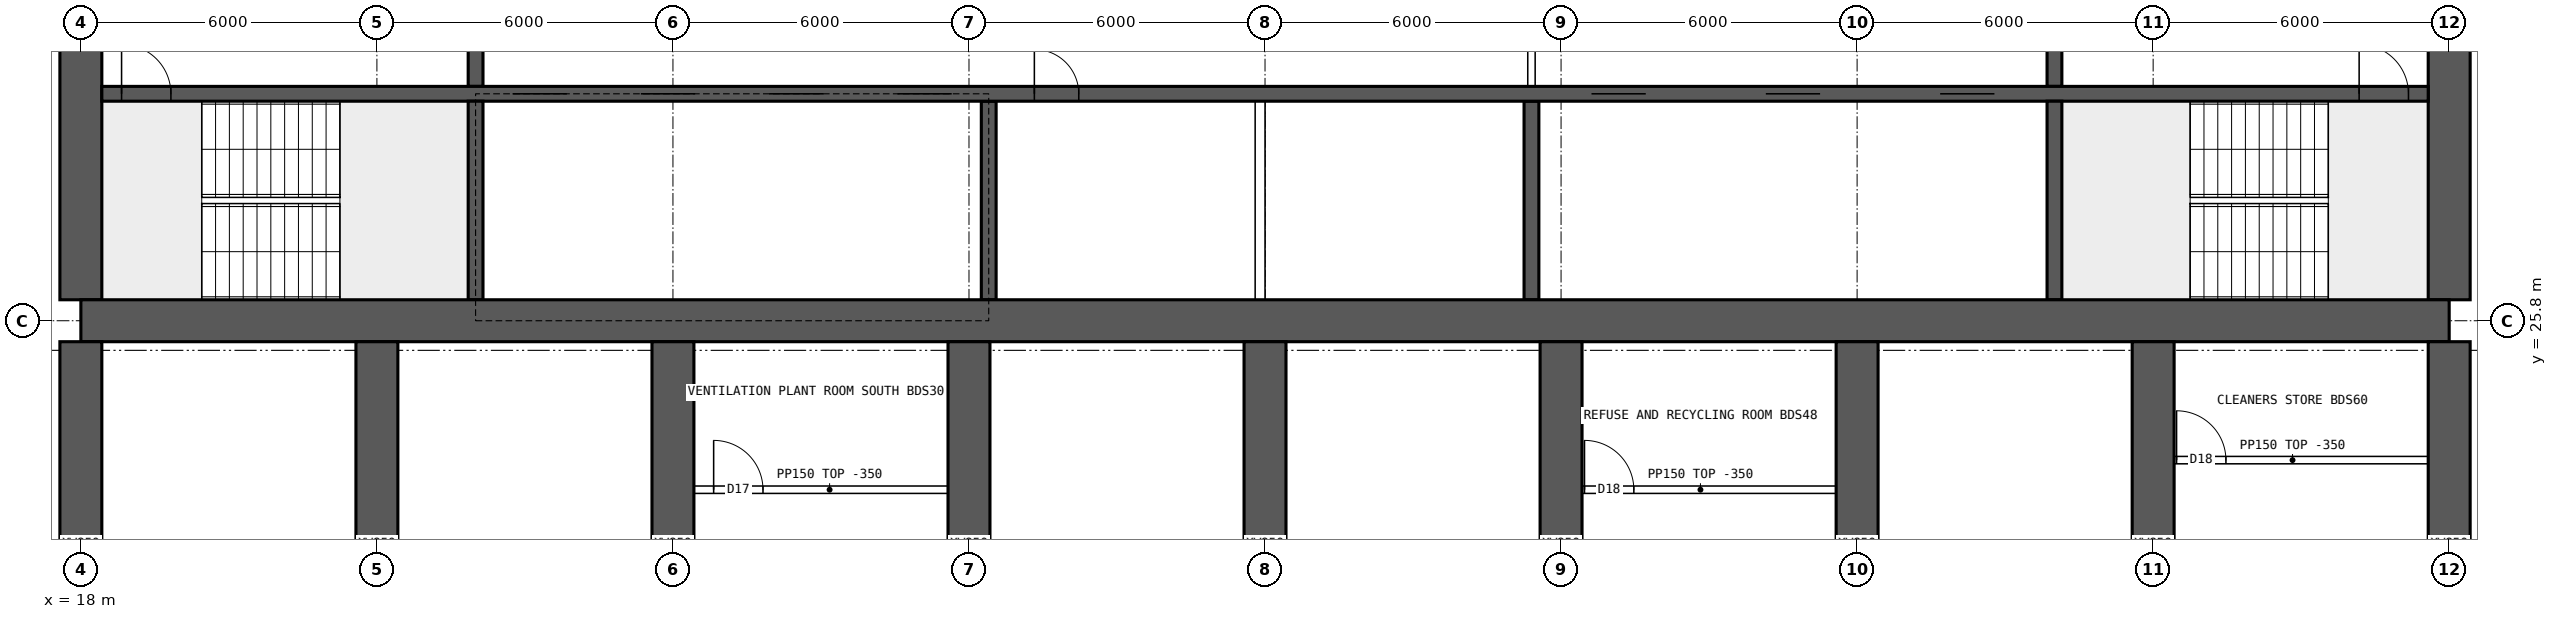
"""IFC4 building model, lengths in metres.
Left out: names, types, materials, properties, quantities, classifications, styles, units other than length and angle.
Written with IfcOpenShell. Run it as: python <this file> out.ifc"""

import sys

from ifc_helpers import new_model, si_unit, direction, frame, frame_2d, origin, place, context, subcontext, project, spatial, rectangle, extrude, element, fill, save


model = new_model("IFC4")
c1 = context("Model", 3, precision=1e-05, world=origin(), true_north=direction((0.0, 1.0)))
c2 = subcontext(c1, "Body", "Model", "MODEL_VIEW")
j1 = project(units=[si_unit("LENGTHUNIT", "METRE"), si_unit("PLANEANGLEUNIT", "RADIAN")], contexts=[c1])
p1 = place(None, origin())
s1 = spatial("IfcSite", under=j1, at=p1, CompositionType="ELEMENT")
p2 = place(p1, origin())
s2 = spatial("IfcBuilding", under=s1, at=p2, CompositionType="ELEMENT")
p3 = place(p2, frame((0.0, 0.0, 197.35)))
s3 = spatial("IfcBuildingStorey", under=s2, at=p3, CompositionType="ELEMENT", Elevation=197.35)
p4 = place(p3, frame((18.0, 25.8, 0.0), z_axis=(0.0, 0.0, 1.0), x_axis=(1.0, 0.0, 0.0)))
e1 = element("IfcWall", 1, at=p4, inside=s3, PredefinedType="SHEAR", context=c2, shape_type="SweptSolid", body=[
    extrude(rectangle(XDim=48.0, YDim=0.85, at=frame_2d((24.0, 0.0))), origin(), (0.0, 0.0, 1.0), 3.75),
])
p5 = place(p3, frame((18.0, 26.225, 0.0), z_axis=(0.0, 0.0, 1.0), x_axis=(0.0, 1.0, 0.0)))
e2 = element("IfcWall", 2, at=p5, inside=s3, PredefinedType="SHEAR", context=c2, shape_type="SweptSolid", body=[
    extrude(rectangle(XDim=11.55, YDim=0.85, at=frame_2d((5.775, 0.0))), origin(), (0.0, 0.0, 1.0), 3.75),
])
p6 = place(p5, frame((5.075, 0.0, 0.0)))
e3 = element("IfcOpeningElement", 3, at=p6, cuts=e2, PredefinedType="OPENING", context=c2, shape_type="SweptSolid", body=[
    extrude(rectangle(XDim=1.2, YDim=2.1, at=frame_2d((0.6, 1.05))), frame((0.0, 0.435, 0.0), z_axis=(0.0, -1.0, 0.0), x_axis=(1.0, 0.0, 0.0)), (0.0, 0.0, 1.0), 0.87),
])
p7 = place(p3, frame((66.0, 26.225, 0.0), z_axis=(0.0, 0.0, 1.0), x_axis=(0.0, 1.0, 0.0)))
e4 = element("IfcWall", 4, at=p7, inside=s3, PredefinedType="SHEAR", context=c2, shape_type="SweptSolid", body=[
    extrude(rectangle(XDim=11.55, YDim=0.85, at=frame_2d((5.775, 0.0))), origin(), (0.0, 0.0, 1.0), 3.75),
])
p8 = place(p7, frame((5.075, 0.0, 0.0)))
e5 = element("IfcOpeningElement", 5, at=p8, cuts=e4, PredefinedType="OPENING", context=c2, shape_type="SweptSolid", body=[
    extrude(rectangle(XDim=1.2, YDim=2.1, at=frame_2d((0.6, 1.05))), frame((0.0, 0.435, 0.0), z_axis=(0.0, -1.0, 0.0), x_axis=(1.0, 0.0, 0.0)), (0.0, 0.0, 1.0), 0.87),
])
p9 = place(p3, frame((18.425, 30.4, 0.0), z_axis=(0.0, 0.0, 1.0), x_axis=(1.0, 0.0, 0.0)))
e6 = element("IfcWall", 6, at=p9, inside=s3, PredefinedType="SHEAR", context=c2, shape_type="SweptSolid", body=[
    extrude(rectangle(XDim=47.15, YDim=0.3, at=frame_2d((23.575, 0.0))), origin(), (0.0, 0.0, 1.0), 3.75),
])
p10 = place(p9, frame((0.4, 0.0, 0.0)))
e7 = element("IfcOpeningElement", 7, at=p10, cuts=e6, PredefinedType="OPENING", context=c2, shape_type="SweptSolid", body=[
    extrude(rectangle(XDim=1.0, YDim=2.1, at=frame_2d((0.5, 1.05))), frame((0.0, 0.16, 0.0), z_axis=(0.0, -1.0, 0.0), x_axis=(1.0, 0.0, 0.0)), (0.0, 0.0, 1.0), 0.32),
])
p11 = place(p9, frame((45.75, 0.0, 0.0)))
e8 = element("IfcOpeningElement", 8, at=p11, cuts=e6, PredefinedType="OPENING", context=c2, shape_type="SweptSolid", body=[
    extrude(rectangle(XDim=1.0, YDim=2.1, at=frame_2d((0.5, 1.05))), frame((0.0, 0.16, 0.0), z_axis=(0.0, -1.0, 0.0), x_axis=(1.0, 0.0, 0.0)), (0.0, 0.0, 1.0), 0.32),
])
p12 = place(p9, frame((8.325, 0.0, 0.0)))
e9 = element("IfcOpeningElement", 9, at=p12, cuts=e6, PredefinedType="OPENING", context=c2, shape_type="SweptSolid", body=[
    extrude(rectangle(XDim=1.1, YDim=2.1, at=frame_2d((0.55, 1.05))), frame((0.0, 0.16, 0.0), z_axis=(0.0, -1.0, 0.0), x_axis=(1.0, 0.0, 0.0)), (0.0, 0.0, 1.0), 0.32),
])
p13 = place(p9, frame((10.925, 0.0, 0.0)))
e10 = element("IfcOpeningElement", 10, at=p13, cuts=e6, PredefinedType="OPENING", context=c2, shape_type="SweptSolid", body=[
    extrude(rectangle(XDim=1.1, YDim=2.1, at=frame_2d((0.55, 1.05))), frame((0.0, 0.16, 0.0), z_axis=(0.0, -1.0, 0.0), x_axis=(1.0, 0.0, 0.0)), (0.0, 0.0, 1.0), 0.32),
])
p14 = place(p9, frame((13.525, 0.0, 0.0)))
e11 = element("IfcOpeningElement", 11, at=p14, cuts=e6, PredefinedType="OPENING", context=c2, shape_type="SweptSolid", body=[
    extrude(rectangle(XDim=1.1, YDim=2.1, at=frame_2d((0.55, 1.05))), frame((0.0, 0.16, 0.0), z_axis=(0.0, -1.0, 0.0), x_axis=(1.0, 0.0, 0.0)), (0.0, 0.0, 1.0), 0.32),
])
p15 = place(p9, frame((16.125, 0.0, 0.0)))
e12 = element("IfcOpeningElement", 12, at=p15, cuts=e6, PredefinedType="OPENING", context=c2, shape_type="SweptSolid", body=[
    extrude(rectangle(XDim=1.1, YDim=2.1, at=frame_2d((0.55, 1.05))), frame((0.0, 0.16, 0.0), z_axis=(0.0, -1.0, 0.0), x_axis=(1.0, 0.0, 0.0)), (0.0, 0.0, 1.0), 0.32),
])
p16 = place(p9, frame((18.9, 0.0, 0.0)))
e13 = element("IfcOpeningElement", 13, at=p16, cuts=e6, PredefinedType="OPENING", context=c2, shape_type="SweptSolid", body=[
    extrude(rectangle(XDim=0.9, YDim=2.1, at=frame_2d((0.45, 1.05))), frame((0.0, 0.16, 0.0), z_axis=(0.0, -1.0, 0.0), x_axis=(1.0, 0.0, 0.0)), (0.0, 0.0, 1.0), 0.32),
])
p17 = place(p9, frame((30.192, 0.0, 0.0)))
e14 = element("IfcOpeningElement", 14, at=p17, cuts=e6, PredefinedType="OPENING", context=c2, shape_type="SweptSolid", body=[
    extrude(rectangle(XDim=1.1, YDim=2.1, at=frame_2d((0.55, 1.05))), frame((0.0, 0.16, 0.0), z_axis=(0.0, -1.0, 0.0), x_axis=(1.0, 0.0, 0.0)), (0.0, 0.0, 1.0), 0.32),
])
p18 = place(p9, frame((33.725, 0.0, 0.0)))
e15 = element("IfcOpeningElement", 15, at=p18, cuts=e6, PredefinedType="OPENING", context=c2, shape_type="SweptSolid", body=[
    extrude(rectangle(XDim=1.1, YDim=2.1, at=frame_2d((0.55, 1.05))), frame((0.0, 0.16, 0.0), z_axis=(0.0, -1.0, 0.0), x_axis=(1.0, 0.0, 0.0)), (0.0, 0.0, 1.0), 0.32),
])
p19 = place(p9, frame((37.258, 0.0, 0.0)))
e16 = element("IfcOpeningElement", 16, at=p19, cuts=e6, PredefinedType="OPENING", context=c2, shape_type="SweptSolid", body=[
    extrude(rectangle(XDim=1.1, YDim=2.1, at=frame_2d((0.55, 1.05))), frame((0.0, 0.16, 0.0), z_axis=(0.0, -1.0, 0.0), x_axis=(1.0, 0.0, 0.0)), (0.0, 0.0, 1.0), 0.32),
])
for number, where, z_axis, x_axis in (
    (17, (26.0, 26.225, 0.0), (0.0, 0.0, 1.0), (0.0, 1.0, 0.0)),
    (18, (58.0, 26.225, 0.0), (0.0, 0.0, 1.0), (0.0, 1.0, 0.0)),
):
    element("IfcWall", number, at=place(p3, frame(where, z_axis=z_axis, x_axis=x_axis)), inside=s3, PredefinedType="SHEAR", context=c2, shape_type="SweptSolid", body=[
        extrude(rectangle(XDim=4.025, YDim=0.3, at=frame_2d((2.012, 0.0))), origin(), (0.0, 0.0, 1.0), 3.75),
    ])
p20 = place(p3, frame((26.0, 30.55, 0.0), z_axis=(0.0, 0.0, 1.0), x_axis=(0.0, 1.0, 0.0)))
e19 = element("IfcWall", 19, at=p20, inside=s3, PredefinedType="SHEAR", context=c2, shape_type="SweptSolid", body=[
    extrude(rectangle(XDim=3.9, YDim=0.3, at=frame_2d((1.95, 0.0))), origin(), (0.0, 0.0, 1.0), 3.75),
])
p21 = place(p20, frame((1.4, 0.0, 0.0)))
e20 = element("IfcOpeningElement", 20, at=p21, cuts=e19, PredefinedType="OPENING", context=c2, shape_type="SweptSolid", body=[
    extrude(rectangle(XDim=1.2, YDim=2.1, at=frame_2d((0.6, 1.05))), frame((0.0, 0.16, 0.0), z_axis=(0.0, -1.0, 0.0), x_axis=(1.0, 0.0, 0.0)), (0.0, 0.0, 1.0), 0.32),
])
p22 = place(p3, frame((58.0, 30.55, 0.0), z_axis=(0.0, 0.0, 1.0), x_axis=(0.0, 1.0, 0.0)))
e21 = element("IfcWall", 21, at=p22, inside=s3, PredefinedType="SHEAR", context=c2, shape_type="SweptSolid", body=[
    extrude(rectangle(XDim=3.9, YDim=0.3, at=frame_2d((1.95, 0.0))), origin(), (0.0, 0.0, 1.0), 3.75),
])
p23 = place(p22, frame((1.4, 0.0, 0.0)))
e22 = element("IfcOpeningElement", 22, at=p23, cuts=e21, PredefinedType="OPENING", context=c2, shape_type="SweptSolid", body=[
    extrude(rectangle(XDim=1.2, YDim=2.1, at=frame_2d((0.6, 1.05))), frame((0.0, 0.16, 0.0), z_axis=(0.0, -1.0, 0.0), x_axis=(1.0, 0.0, 0.0)), (0.0, 0.0, 1.0), 0.32),
])
for number, where, z_axis, x_axis in (
    (23, (36.4, 26.225, 0.0), (0.0, 0.0, 1.0), (0.0, 1.0, 0.0)),
    (24, (47.4, 26.225, 0.0), (0.0, 0.0, 1.0), (0.0, 1.0, 0.0)),
):
    element("IfcWall", number, at=place(p3, frame(where, z_axis=z_axis, x_axis=x_axis)), inside=s3, PredefinedType="SHEAR", context=c2, shape_type="SweptSolid", body=[
        extrude(rectangle(XDim=4.025, YDim=0.3, at=frame_2d((2.012, 0.0))), origin(), (0.0, 0.0, 1.0), 3.75),
    ])
for number, where, z_axis, x_axis in (
    (25, (18.0, 17.2, 0.0), (0.0, 0.0, 1.0), (0.0, 1.0, 0.0)),
    (26, (24.0, 17.2, 0.0), (0.0, 0.0, 1.0), (0.0, 1.0, 0.0)),
    (27, (30.0, 17.2, 0.0), (0.0, 0.0, 1.0), (0.0, 1.0, 0.0)),
    (28, (36.0, 17.2, 0.0), (0.0, 0.0, 1.0), (0.0, 1.0, 0.0)),
    (29, (42.0, 17.2, 0.0), (0.0, 0.0, 1.0), (0.0, 1.0, 0.0)),
    (30, (48.0, 17.2, 0.0), (0.0, 0.0, 1.0), (0.0, 1.0, 0.0)),
    (31, (54.0, 17.2, 0.0), (0.0, 0.0, 1.0), (0.0, 1.0, 0.0)),
    (32, (60.0, 17.2, 0.0), (0.0, 0.0, 1.0), (0.0, 1.0, 0.0)),
    (33, (66.0, 17.2, 0.0), (0.0, 0.0, 1.0), (0.0, 1.0, 0.0)),
):
    element("IfcWall", number, at=place(p3, frame(where, z_axis=z_axis, x_axis=x_axis)), inside=s3, PredefinedType="SHEAR", context=c2, shape_type="SweptSolid", body=[
        extrude(rectangle(XDim=8.175, YDim=0.85, at=frame_2d((4.087, 0.0))), origin(), (0.0, 0.0, 1.0), 3.75),
    ])
p24 = place(p3, frame((47.4, 30.55, 0.0), z_axis=(0.0, 0.0, 1.0), x_axis=(0.0, 1.0, 0.0)))
e34 = element("IfcWall", 34, at=p24, inside=s3, PredefinedType="SOLIDWALL", context=c2, shape_type="SweptSolid", body=[
    extrude(rectangle(XDim=3.9, YDim=0.15, at=frame_2d((1.95, 0.0))), origin(), (0.0, 0.0, 1.0), 3.4),
])
p25 = place(p24, frame((1.15, 0.0, 0.0)))
e35 = element("IfcOpeningElement", 35, at=p25, cuts=e34, PredefinedType="OPENING", context=c2, shape_type="SweptSolid", body=[
    extrude(rectangle(XDim=1.6, YDim=2.1, at=frame_2d((0.8, 1.05))), frame((0.0, 0.085, 0.0), z_axis=(0.0, -1.0, 0.0), x_axis=(1.0, 0.0, 0.0)), (0.0, 0.0, 1.0), 0.17),
])
p26 = place(p3, frame((41.9, 26.225, 0.0), z_axis=(0.0, 0.0, 1.0), x_axis=(0.0, 1.0, 0.0)))
e36 = element("IfcWall", 36, at=p26, inside=s3, PredefinedType="SOLIDWALL", context=c2, shape_type="SweptSolid", body=[
    extrude(rectangle(XDim=4.025, YDim=0.2, at=frame_2d((2.012, 0.0))), origin(), (0.0, 0.0, 1.0), 3.4),
])
p27 = place(p3, frame((30.425, 22.375, 0.0), z_axis=(0.0, 0.0, 1.0), x_axis=(1.0, 0.0, 0.0)))
e37 = element("IfcWall", 37, at=p27, inside=s3, PredefinedType="PARTITIONING", context=c2, shape_type="SweptSolid", body=[
    extrude(rectangle(XDim=5.5, YDim=0.15, at=frame_2d((2.75, 0.0))), origin(), (0.0, 0.0, 1.0), 3.4),
])
p28 = place(p27, frame((0.4, 0.0, 0.0)))
e38 = element("IfcOpeningElement", 38, at=p28, cuts=e37, PredefinedType="OPENING", context=c2, shape_type="SweptSolid", body=[
    extrude(rectangle(XDim=1.0, YDim=2.1, at=frame_2d((0.5, 1.05))), frame((0.0, 0.085, 0.0), z_axis=(0.0, -1.0, 0.0), x_axis=(1.0, 0.0, 0.0)), (0.0, 0.0, 1.0), 0.17),
])
p29 = place(p3, frame((48.075, 22.375, 0.0), z_axis=(0.0, 0.0, 1.0), x_axis=(1.0, 0.0, 0.0)))
e39 = element("IfcWall", 39, at=p29, inside=s3, PredefinedType="PARTITIONING", context=c2, shape_type="SweptSolid", body=[
    extrude(rectangle(XDim=5.5, YDim=0.15, at=frame_2d((2.75, 0.0))), origin(), (0.0, 0.0, 1.0), 3.4),
])
p30 = place(p29, frame((0.4, 0.0, 0.0)))
e40 = element("IfcOpeningElement", 40, at=p30, cuts=e39, PredefinedType="OPENING", context=c2, shape_type="SweptSolid", body=[
    extrude(rectangle(XDim=1.0, YDim=2.1, at=frame_2d((0.5, 1.05))), frame((0.0, 0.085, 0.0), z_axis=(0.0, -1.0, 0.0), x_axis=(1.0, 0.0, 0.0)), (0.0, 0.0, 1.0), 0.17),
])
p31 = place(p3, frame((60.075, 22.975, 0.0), z_axis=(0.0, 0.0, 1.0), x_axis=(1.0, 0.0, 0.0)))
e41 = element("IfcWall", 41, at=p31, inside=s3, PredefinedType="PARTITIONING", context=c2, shape_type="SweptSolid", body=[
    extrude(rectangle(XDim=5.5, YDim=0.15, at=frame_2d((2.75, 0.0))), origin(), (0.0, 0.0, 1.0), 3.4),
])
p32 = place(p31, frame((0.4, 0.0, 0.0)))
e42 = element("IfcOpeningElement", 42, at=p32, cuts=e41, PredefinedType="OPENING", context=c2, shape_type="SweptSolid", body=[
    extrude(rectangle(XDim=1.0, YDim=2.1, at=frame_2d((0.5, 1.05))), frame((0.0, 0.085, 0.0), z_axis=(0.0, -1.0, 0.0), x_axis=(1.0, 0.0, 0.0)), (0.0, 0.0, 1.0), 0.17),
])
p33 = place(p10, origin())
e43 = element("IfcDoor", 43, at=p33, inside=s3, OperationType="SINGLE_SWING_LEFT", PredefinedType="DOOR", context=c2, shape_type="SweptSolid", body=[
    extrude(rectangle(XDim=1.0, YDim=2.1, at=frame_2d((0.5, 1.05))), frame((0.0, 0.025, 0.0), z_axis=(0.0, -1.0, 0.0), x_axis=(1.0, 0.0, 0.0)), (0.0, 0.0, 1.0), 0.05),
])
fill(e7, e43)
p34 = place(p11, origin())
e44 = element("IfcDoor", 44, at=p34, inside=s3, OperationType="SINGLE_SWING_LEFT", PredefinedType="DOOR", context=c2, shape_type="SweptSolid", body=[
    extrude(rectangle(XDim=1.0, YDim=2.1, at=frame_2d((0.5, 1.05))), frame((0.0, 0.025, 0.0), z_axis=(0.0, -1.0, 0.0), x_axis=(1.0, 0.0, 0.0)), (0.0, 0.0, 1.0), 0.05),
])
fill(e8, e44)
p35 = place(p12, origin())
e45 = element("IfcDoor", 45, at=p35, inside=s3, OperationType="DOUBLE_DOOR_SLIDING", PredefinedType="DOOR", context=c2, shape_type="SweptSolid", body=[
    extrude(rectangle(XDim=1.1, YDim=2.1, at=frame_2d((0.55, 1.05))), frame((0.0, 0.025, 0.0), z_axis=(0.0, -1.0, 0.0), x_axis=(1.0, 0.0, 0.0)), (0.0, 0.0, 1.0), 0.05),
])
fill(e9, e45)
p36 = place(p13, origin())
e46 = element("IfcDoor", 46, at=p36, inside=s3, OperationType="DOUBLE_DOOR_SLIDING", PredefinedType="DOOR", context=c2, shape_type="SweptSolid", body=[
    extrude(rectangle(XDim=1.1, YDim=2.1, at=frame_2d((0.55, 1.05))), frame((0.0, 0.025, 0.0), z_axis=(0.0, -1.0, 0.0), x_axis=(1.0, 0.0, 0.0)), (0.0, 0.0, 1.0), 0.05),
])
fill(e10, e46)
p37 = place(p14, origin())
e47 = element("IfcDoor", 47, at=p37, inside=s3, OperationType="DOUBLE_DOOR_SLIDING", PredefinedType="DOOR", context=c2, shape_type="SweptSolid", body=[
    extrude(rectangle(XDim=1.1, YDim=2.1, at=frame_2d((0.55, 1.05))), frame((0.0, 0.025, 0.0), z_axis=(0.0, -1.0, 0.0), x_axis=(1.0, 0.0, 0.0)), (0.0, 0.0, 1.0), 0.05),
])
fill(e11, e47)
p38 = place(p15, origin())
e48 = element("IfcDoor", 48, at=p38, inside=s3, OperationType="DOUBLE_DOOR_SLIDING", PredefinedType="DOOR", context=c2, shape_type="SweptSolid", body=[
    extrude(rectangle(XDim=1.1, YDim=2.1, at=frame_2d((0.55, 1.05))), frame((0.0, 0.025, 0.0), z_axis=(0.0, -1.0, 0.0), x_axis=(1.0, 0.0, 0.0)), (0.0, 0.0, 1.0), 0.05),
])
fill(e12, e48)
p39 = place(p16, origin())
e49 = element("IfcDoor", 49, at=p39, inside=s3, OperationType="SINGLE_SWING_LEFT", PredefinedType="DOOR", context=c2, shape_type="SweptSolid", body=[
    extrude(rectangle(XDim=0.9, YDim=2.1, at=frame_2d((0.45, 1.05))), frame((0.0, 0.025, 0.0), z_axis=(0.0, -1.0, 0.0), x_axis=(1.0, 0.0, 0.0)), (0.0, 0.0, 1.0), 0.05),
])
fill(e13, e49)
p40 = place(p17, origin())
e50 = element("IfcDoor", 50, at=p40, inside=s3, OperationType="DOUBLE_DOOR_SLIDING", PredefinedType="DOOR", context=c2, shape_type="SweptSolid", body=[
    extrude(rectangle(XDim=1.1, YDim=2.1, at=frame_2d((0.55, 1.05))), frame((0.0, 0.025, 0.0), z_axis=(0.0, -1.0, 0.0), x_axis=(1.0, 0.0, 0.0)), (0.0, 0.0, 1.0), 0.05),
])
fill(e14, e50)
p41 = place(p18, origin())
e51 = element("IfcDoor", 51, at=p41, inside=s3, OperationType="DOUBLE_DOOR_SLIDING", PredefinedType="DOOR", context=c2, shape_type="SweptSolid", body=[
    extrude(rectangle(XDim=1.1, YDim=2.1, at=frame_2d((0.55, 1.05))), frame((0.0, 0.025, 0.0), z_axis=(0.0, -1.0, 0.0), x_axis=(1.0, 0.0, 0.0)), (0.0, 0.0, 1.0), 0.05),
])
fill(e15, e51)
p42 = place(p19, origin())
e52 = element("IfcDoor", 52, at=p42, inside=s3, OperationType="DOUBLE_DOOR_SLIDING", PredefinedType="DOOR", context=c2, shape_type="SweptSolid", body=[
    extrude(rectangle(XDim=1.1, YDim=2.1, at=frame_2d((0.55, 1.05))), frame((0.0, 0.025, 0.0), z_axis=(0.0, -1.0, 0.0), x_axis=(1.0, 0.0, 0.0)), (0.0, 0.0, 1.0), 0.05),
])
fill(e16, e52)
p43 = place(p28, origin())
e53 = element("IfcDoor", 53, at=p43, inside=s3, OperationType="SINGLE_SWING_LEFT", PredefinedType="DOOR", context=c2, shape_type="SweptSolid", body=[
    extrude(rectangle(XDim=1.0, YDim=2.1, at=frame_2d((0.5, 1.05))), frame((0.0, 0.025, 0.0), z_axis=(0.0, -1.0, 0.0), x_axis=(1.0, 0.0, 0.0)), (0.0, 0.0, 1.0), 0.05),
])
fill(e38, e53)
p44 = place(p30, origin())
e54 = element("IfcDoor", 54, at=p44, inside=s3, OperationType="SINGLE_SWING_LEFT", PredefinedType="DOOR", context=c2, shape_type="SweptSolid", body=[
    extrude(rectangle(XDim=1.0, YDim=2.1, at=frame_2d((0.5, 1.05))), frame((0.0, 0.025, 0.0), z_axis=(0.0, -1.0, 0.0), x_axis=(1.0, 0.0, 0.0)), (0.0, 0.0, 1.0), 0.05),
])
fill(e40, e54)
p45 = place(p32, origin())
e55 = element("IfcDoor", 55, at=p45, inside=s3, OperationType="SINGLE_SWING_LEFT", PredefinedType="DOOR", context=c2, shape_type="SweptSolid", body=[
    extrude(rectangle(XDim=1.0, YDim=2.1, at=frame_2d((0.5, 1.05))), frame((0.0, 0.025, 0.0), z_axis=(0.0, -1.0, 0.0), x_axis=(1.0, 0.0, 0.0)), (0.0, 0.0, 1.0), 0.05),
])
fill(e42, e55)
save(model, sys.argv[1])
